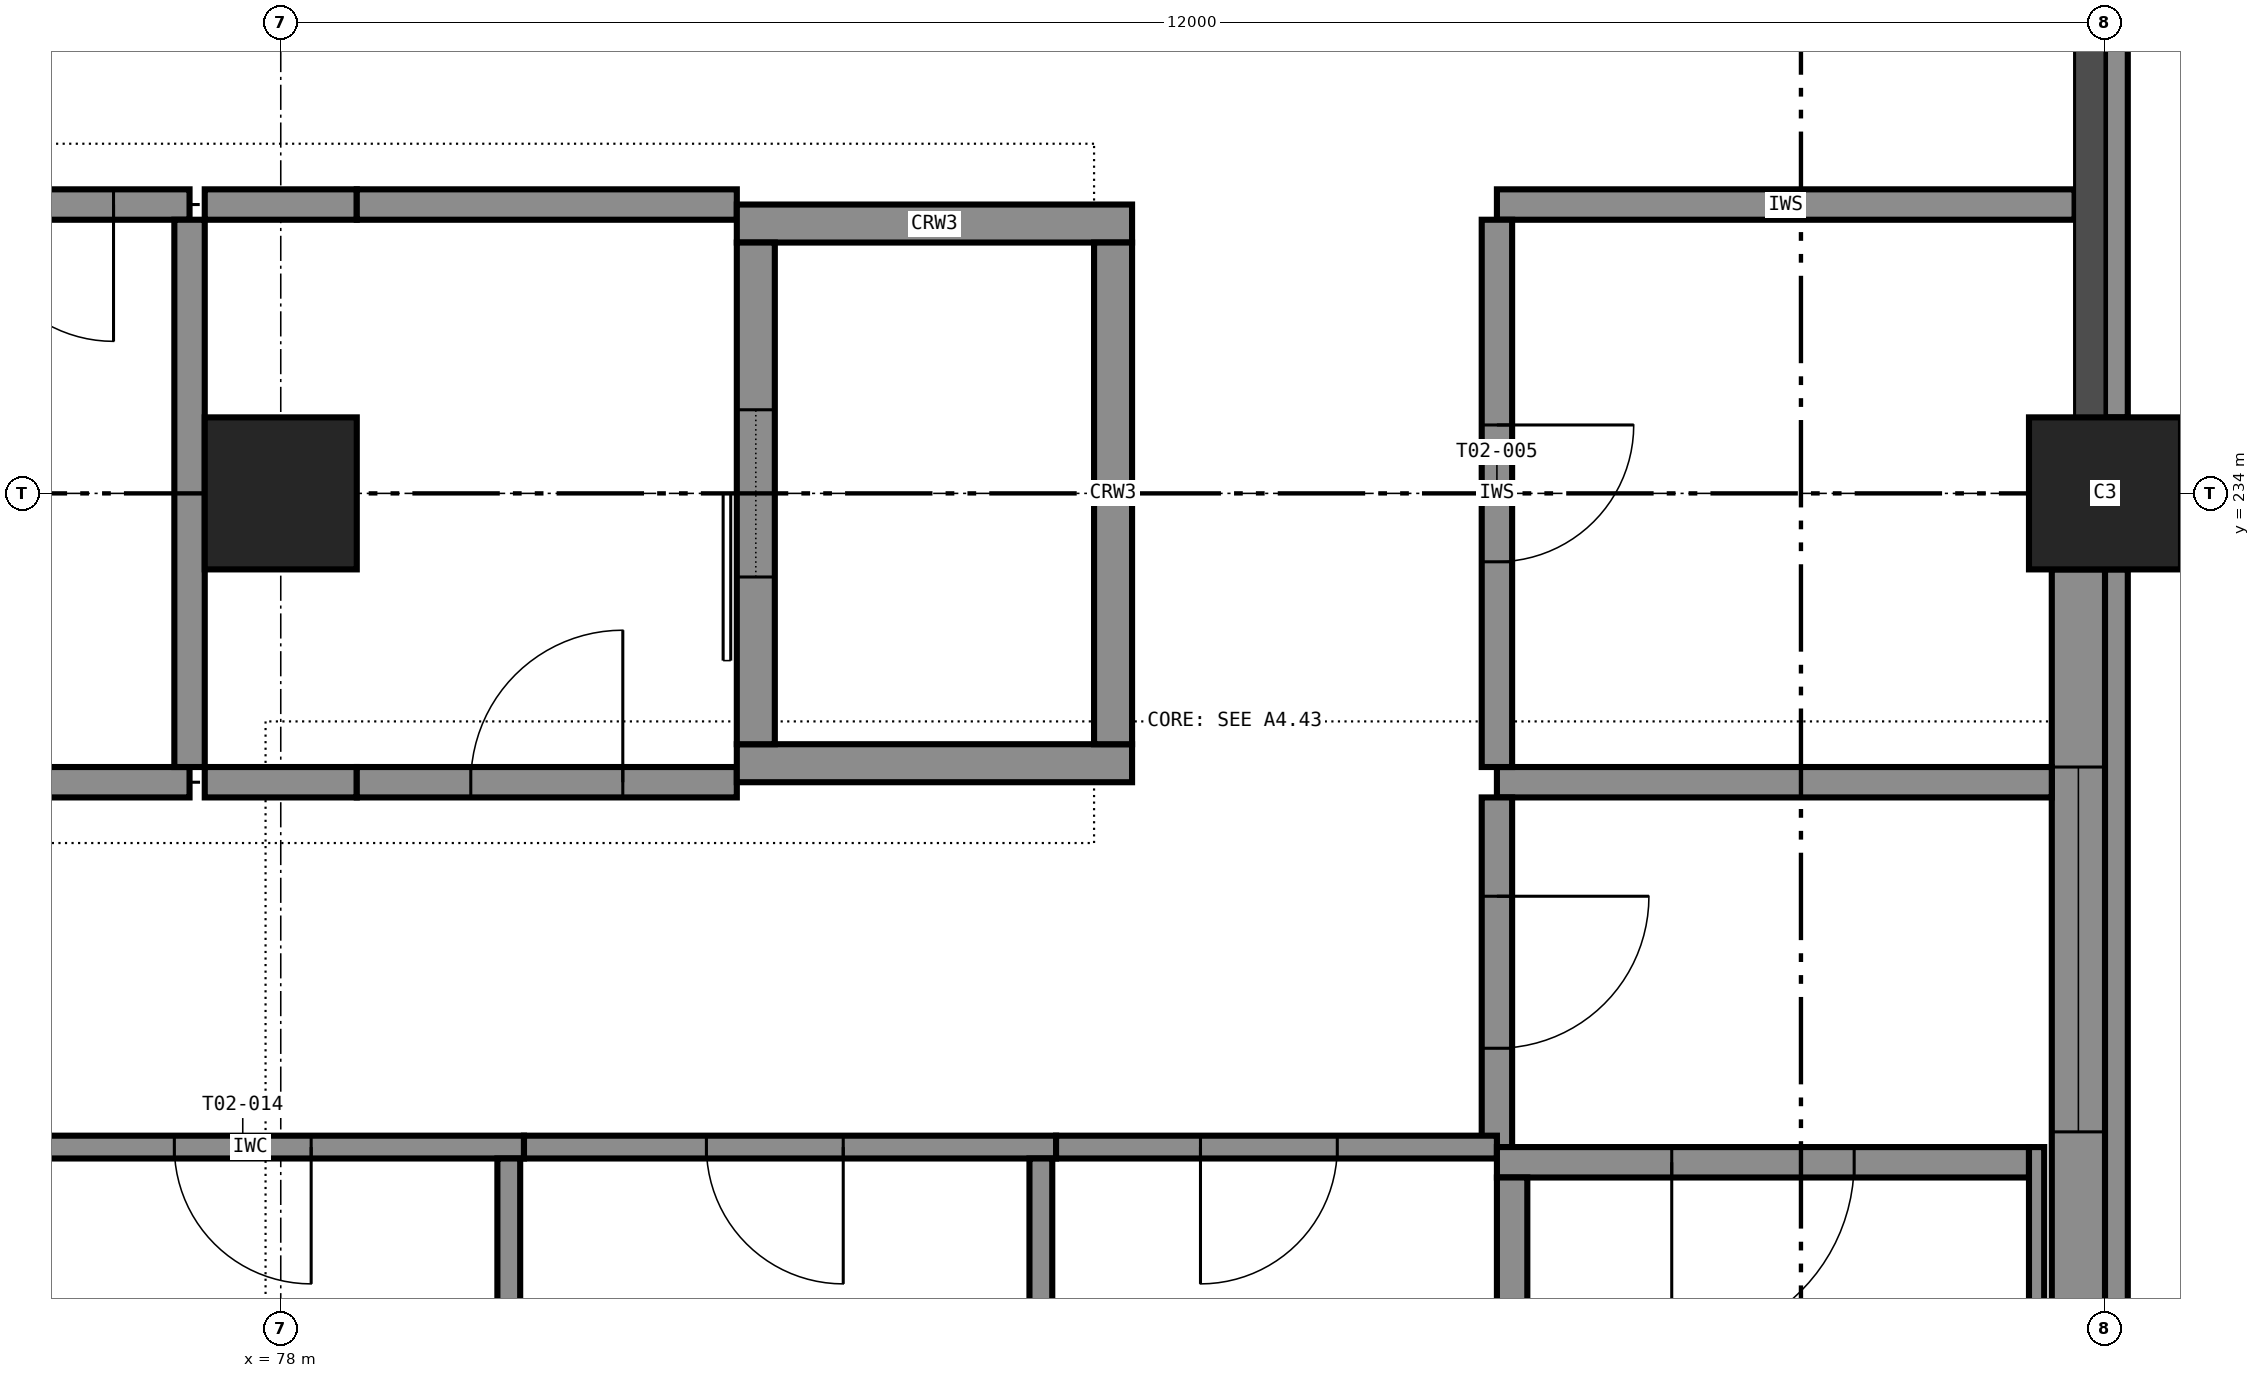
"""IFC4 building model, lengths in metres.
Left out: names, types, materials, properties, quantities, classifications, styles, units other than length and angle.
Written with IfcOpenShell. Run it as: python <this file> out.ifc"""

import sys

from ifc_helpers import new_model, si_unit, direction, frame, frame_2d, origin, origin_2d, place, context, subcontext, project, spatial, rectangle, extrude, element, fill, save


model = new_model("IFC4")
c1 = context("Model", 3, precision=1e-05, world=origin(), true_north=direction((0.0, 1.0)))
c2 = subcontext(c1, "Body", "Model", "MODEL_VIEW")
j1 = project(units=[si_unit("LENGTHUNIT", "METRE"), si_unit("PLANEANGLEUNIT", "RADIAN")], contexts=[c1])
p1 = place(None, origin())
s1 = spatial("IfcSite", under=j1, at=p1, CompositionType="ELEMENT")
p2 = place(p1, origin())
s2 = spatial("IfcBuilding", under=s1, at=p2, CompositionType="ELEMENT")
p3 = place(p2, frame((0.0, 0.0, 12.0)))
s3 = spatial("IfcBuildingStorey", under=s2, at=p3, CompositionType="ELEMENT", Elevation=12.0)
for number, where, z_axis, x_axis in (
    (1, (78.0, 234.0, 0.0), (0.0, 0.0, 1.0), (1.0, 0.0, 0.0)),
    (2, (90.0, 234.0, 0.0), (0.0, 0.0, 1.0), (1.0, 0.0, 0.0)),
):
    element("IfcColumn", number, at=place(p3, frame(where, z_axis=z_axis, x_axis=x_axis)), inside=s3, PredefinedType="COLUMN", context=c2, shape_type="SweptSolid", body=[
        extrude(rectangle(XDim=1.0, YDim=1.0, at=origin_2d()), origin(), (0.0, 0.0, 1.0), 5.0),
    ])
for number, where, z_axis, x_axis in (
    (3, (81.0, 232.225, 0.0), (0.0, 0.0, 1.0), (1.0, 0.0, 0.0)),
    (4, (81.0, 235.775, 0.0), (0.0, 0.0, 1.0), (1.0, 0.0, 0.0)),
):
    element("IfcWall", number, at=place(p3, frame(where, z_axis=z_axis, x_axis=x_axis)), inside=s3, PredefinedType="SHEAR", context=c2, shape_type="SweptSolid", body=[
        extrude(rectangle(XDim=2.6, YDim=0.25, at=frame_2d((1.3, 0.0))), origin(), (0.0, 0.0, 1.0), 5.0),
    ])
p4 = place(p3, frame((81.125, 232.35, 0.0), z_axis=(0.0, 0.0, 1.0), x_axis=(0.0, 1.0, 0.0)))
e5 = element("IfcWall", 5, at=p4, inside=s3, PredefinedType="SHEAR", context=c2, shape_type="SweptSolid", body=[
    extrude(rectangle(XDim=3.3, YDim=0.25, at=frame_2d((1.65, 0.0))), origin(), (0.0, 0.0, 1.0), 5.0),
])
p5 = place(p4, frame((1.1, 0.0, 0.0)))
e6 = element("IfcOpeningElement", 6, at=p5, cuts=e5, PredefinedType="OPENING", context=c2, shape_type="SweptSolid", body=[
    extrude(rectangle(XDim=1.1, YDim=2.1, at=frame_2d((0.55, 1.05))), frame((0.0, 0.135, 0.0), z_axis=(0.0, -1.0, 0.0), x_axis=(1.0, 0.0, 0.0)), (0.0, 0.0, 1.0), 0.27),
])
p6 = place(p3, frame((83.475, 232.35, 0.0), z_axis=(0.0, 0.0, 1.0), x_axis=(0.0, 1.0, 0.0)))
e7 = element("IfcWall", 7, at=p6, inside=s3, PredefinedType="SHEAR", context=c2, shape_type="SweptSolid", body=[
    extrude(rectangle(XDim=3.3, YDim=0.25, at=frame_2d((1.65, 0.0))), origin(), (0.0, 0.0, 1.0), 5.0),
])
p7 = place(p3, frame((89.5, 229.6, 0.0), z_axis=(0.0, 0.0, 1.0), x_axis=(-1.0, 0.0, 0.0)))
e8 = element("IfcWall", 8, at=p7, inside=s3, PredefinedType="SHEAR", context=c2, shape_type="SweptSolid", body=[
    extrude(rectangle(XDim=3.5, YDim=0.2, at=frame_2d((1.75, 0.0))), origin(), (0.0, 0.0, 1.0), 5.0),
])
p8 = place(p7, frame((1.15, 0.0, 0.0)))
e9 = element("IfcOpeningElement", 9, at=p8, cuts=e8, PredefinedType="OPENING", context=c2, shape_type="SweptSolid", body=[
    extrude(rectangle(XDim=1.2, YDim=2.1, at=frame_2d((0.6, 1.05))), frame((0.0, 0.11, 0.0), z_axis=(0.0, -1.0, 0.0), x_axis=(1.0, 0.0, 0.0)), (0.0, 0.0, 1.0), 0.22),
])
p9 = place(p3, frame((86.1, 222.0, 0.0), z_axis=(0.0, 0.0, 1.0), x_axis=(0.0, 1.0, 0.0)))
e10 = element("IfcWall", 10, at=p9, inside=s3, PredefinedType="SHEAR", context=c2, shape_type="SweptSolid", body=[
    extrude(rectangle(XDim=7.5, YDim=0.2, at=frame_2d((3.75, 0.0))), origin(), (0.0, 0.0, 1.0), 5.0),
])
p10 = place(p3, frame((89.55, 229.7, 0.0), z_axis=(0.0, 0.0, 1.0), x_axis=(0.0, -1.0, 0.0)))
e11 = element("IfcWall", 11, at=p10, inside=s3, PredefinedType="SHEAR", context=c2, shape_type="SweptSolid", body=[
    extrude(rectangle(XDim=7.7, YDim=0.1, at=frame_2d((3.85, 0.0))), origin(), (0.0, 0.0, 1.0), 4.75),
])
p11 = place(p3, frame((89.825, 222.0, 0.0), z_axis=(0.0, 0.0, 1.0), x_axis=(0.0, 1.0, 0.0)))
e12 = element("IfcWall", 12, at=p11, inside=s3, PredefinedType="STANDARD", context=c2, shape_type="SweptSolid", body=[
    extrude(rectangle(XDim=11.5, YDim=0.35, at=frame_2d((5.75, 0.0))), origin(), (0.0, 0.0, 1.0), 3.75),
])
p12 = place(p11, frame((1.55, 0.0, 0.6)))
e13 = element("IfcOpeningElement", 13, at=p12, cuts=e12, PredefinedType="OPENING", context=c2, shape_type="SweptSolid", body=[
    extrude(rectangle(XDim=2.4, YDim=2.4, at=frame_2d((1.2, 1.2))), frame((0.0, 0.185, 0.0), z_axis=(0.0, -1.0, 0.0), x_axis=(1.0, 0.0, 0.0)), (0.0, 0.0, 1.0), 0.37),
])
p13 = place(p11, frame((7.8, 0.0, 0.6)))
e14 = element("IfcOpeningElement", 14, at=p13, cuts=e12, PredefinedType="OPENING", context=c2, shape_type="SweptSolid", body=[
    extrude(rectangle(XDim=2.4, YDim=2.4, at=frame_2d((1.2, 1.2))), frame((0.0, 0.185, 0.0), z_axis=(0.0, -1.0, 0.0), x_axis=(1.0, 0.0, 0.0)), (0.0, 0.0, 1.0), 0.37),
])
p14 = place(p3, frame((90.075, 222.0, 4.75), z_axis=(0.0, 0.0, 1.0), x_axis=(0.0, 1.0, 0.0)))
e15 = element("IfcWall", 15, at=p14, inside=s3, PredefinedType="STANDARD", context=c2, shape_type="SweptSolid", body=[
    extrude(rectangle(XDim=11.5, YDim=0.15, at=frame_2d((5.75, 0.0))), origin(), (0.0, 0.0, 1.0), 0.25),
])
p15 = place(p3, frame((90.075, 234.5, 4.75), z_axis=(0.0, 0.0, 1.0), x_axis=(0.0, 1.0, 0.0)))
e16 = element("IfcWall", 16, at=p15, inside=s3, PredefinedType="STANDARD", context=c2, shape_type="SweptSolid", body=[
    extrude(rectangle(XDim=11.0, YDim=0.15, at=frame_2d((5.5, 0.0))), origin(), (0.0, 0.0, 1.0), 0.25),
])
p16 = place(p3, frame((75.5, 232.1, 0.0), z_axis=(0.0, 0.0, 1.0), x_axis=(1.0, 0.0, 0.0)))
e17 = element("IfcWall", 17, at=p16, inside=s3, PredefinedType="PARTITIONING", context=c2, shape_type="SweptSolid", body=[
    extrude(rectangle(XDim=1.9, YDim=0.2, at=frame_2d((0.95, 0.0))), origin(), (0.0, 0.0, 1.0), 4.75),
])
p17 = place(p3, frame((77.5, 232.1, 0.0), z_axis=(0.0, 0.0, 1.0), x_axis=(1.0, 0.0, 0.0)))
e18 = element("IfcWall", 18, at=p17, inside=s3, PredefinedType="PARTITIONING", context=c2, shape_type="SweptSolid", body=[
    extrude(rectangle(XDim=1.0, YDim=0.2, at=frame_2d((0.5, 0.0))), origin(), (0.0, 0.0, 1.0), 4.75),
])
p18 = place(p3, frame((78.5, 232.1, 0.0), z_axis=(0.0, 0.0, 1.0), x_axis=(1.0, 0.0, 0.0)))
e19 = element("IfcWall", 19, at=p18, inside=s3, PredefinedType="PARTITIONING", context=c2, shape_type="SweptSolid", body=[
    extrude(rectangle(XDim=2.5, YDim=0.2, at=frame_2d((1.25, 0.0))), origin(), (0.0, 0.0, 1.0), 4.75),
])
p19 = place(p18, frame((0.75, 0.0, 0.0)))
e20 = element("IfcOpeningElement", 20, at=p19, cuts=e19, PredefinedType="OPENING", context=c2, shape_type="SweptSolid", body=[
    extrude(rectangle(XDim=1.0, YDim=2.1, at=frame_2d((0.5, 1.05))), frame((0.0, 0.11, 0.0), z_axis=(0.0, -1.0, 0.0), x_axis=(1.0, 0.0, 0.0)), (0.0, 0.0, 1.0), 0.22),
])
p20 = place(p3, frame((86.0, 232.1, 0.0), z_axis=(0.0, 0.0, 1.0), x_axis=(1.0, 0.0, 0.0)))
e21 = element("IfcWall", 21, at=p20, inside=s3, PredefinedType="PARTITIONING", context=c2, shape_type="SweptSolid", body=[
    extrude(rectangle(XDim=3.65, YDim=0.2, at=frame_2d((1.825, 0.0))), origin(), (0.0, 0.0, 1.0), 4.75),
])
p21 = place(p3, frame((77.4, 235.9, 0.0), z_axis=(0.0, 0.0, 1.0), x_axis=(-1.0, 0.0, 0.0)))
e22 = element("IfcWall", 22, at=p21, inside=s3, PredefinedType="PARTITIONING", context=c2, shape_type="SweptSolid", body=[
    extrude(rectangle(XDim=1.9, YDim=0.2, at=frame_2d((0.95, 0.0))), origin(), (0.0, 0.0, 1.0), 4.75),
])
p22 = place(p21, frame((0.5, 0.0, 0.0)))
e23 = element("IfcOpeningElement", 23, at=p22, cuts=e22, PredefinedType="OPENING", context=c2, shape_type="SweptSolid", body=[
    extrude(rectangle(XDim=0.9, YDim=2.1, at=frame_2d((0.45, 1.05))), frame((0.0, 0.11, 0.0), z_axis=(0.0, -1.0, 0.0), x_axis=(1.0, 0.0, 0.0)), (0.0, 0.0, 1.0), 0.22),
])
p23 = place(p3, frame((77.5, 235.9, 0.0), z_axis=(0.0, 0.0, 1.0), x_axis=(1.0, 0.0, 0.0)))
e24 = element("IfcWall", 24, at=p23, inside=s3, PredefinedType="PARTITIONING", context=c2, shape_type="SweptSolid", body=[
    extrude(rectangle(XDim=1.0, YDim=0.2, at=frame_2d((0.5, 0.0))), origin(), (0.0, 0.0, 1.0), 4.75),
])
p24 = place(p3, frame((78.5, 235.9, 0.0), z_axis=(0.0, 0.0, 1.0), x_axis=(1.0, 0.0, 0.0)))
e25 = element("IfcWall", 25, at=p24, inside=s3, PredefinedType="PARTITIONING", context=c2, shape_type="SweptSolid", body=[
    extrude(rectangle(XDim=2.5, YDim=0.2, at=frame_2d((1.25, 0.0))), origin(), (0.0, 0.0, 1.0), 4.75),
])
p25 = place(p3, frame((86.0, 235.9, 0.0), z_axis=(0.0, 0.0, 1.0), x_axis=(1.0, 0.0, 0.0)))
e26 = element("IfcWall", 26, at=p25, inside=s3, PredefinedType="PARTITIONING", context=c2, shape_type="SweptSolid", body=[
    extrude(rectangle(XDim=3.8, YDim=0.2, at=frame_2d((1.9, 0.0))), origin(), (0.0, 0.0, 1.0), 4.75),
])
p26 = place(p3, frame((77.4, 232.2, 0.0), z_axis=(0.0, 0.0, 1.0), x_axis=(0.0, 1.0, 0.0)))
e27 = element("IfcWall", 27, at=p26, inside=s3, PredefinedType="PARTITIONING", context=c2, shape_type="SweptSolid", body=[
    extrude(rectangle(XDim=3.6, YDim=0.2, at=frame_2d((1.8, 0.0))), origin(), (0.0, 0.0, 1.0), 4.75),
])
p27 = place(p3, frame((86.0, 235.8, 0.0), z_axis=(0.0, 0.0, 1.0), x_axis=(0.0, -1.0, 0.0)))
e28 = element("IfcWall", 28, at=p27, inside=s3, PredefinedType="PARTITIONING", context=c2, shape_type="SweptSolid", body=[
    extrude(rectangle(XDim=3.6, YDim=0.2, at=frame_2d((1.8, 0.0))), origin(), (0.0, 0.0, 1.0), 4.75),
])
p28 = place(p27, frame((1.35, 0.0, 0.0)))
e29 = element("IfcOpeningElement", 29, at=p28, cuts=e28, PredefinedType="OPENING", context=c2, shape_type="SweptSolid", body=[
    extrude(rectangle(XDim=0.9, YDim=2.1, at=frame_2d((0.45, 1.05))), frame((0.0, 0.11, 0.0), z_axis=(0.0, -1.0, 0.0), x_axis=(1.0, 0.0, 0.0)), (0.0, 0.0, 1.0), 0.22),
])
p29 = place(p3, frame((86.0, 232.0, 0.0), z_axis=(0.0, 0.0, 1.0), x_axis=(0.0, -1.0, 0.0)))
e30 = element("IfcWall", 30, at=p29, inside=s3, PredefinedType="PARTITIONING", context=c2, shape_type="SweptSolid", body=[
    extrude(rectangle(XDim=2.3, YDim=0.2, at=frame_2d((1.15, 0.0))), origin(), (0.0, 0.0, 1.0), 4.75),
])
p30 = place(p29, frame((0.65, 0.0, 0.0)))
e31 = element("IfcOpeningElement", 31, at=p30, cuts=e30, PredefinedType="OPENING", context=c2, shape_type="SweptSolid", body=[
    extrude(rectangle(XDim=1.0, YDim=2.1, at=frame_2d((0.5, 1.05))), frame((0.0, 0.11, 0.0), z_axis=(0.0, -1.0, 0.0), x_axis=(1.0, 0.0, 0.0)), (0.0, 0.0, 1.0), 0.22),
])
p31 = place(p3, frame((79.6, 229.7, 0.0), z_axis=(0.0, 0.0, 1.0), x_axis=(-1.0, 0.0, 0.0)))
e32 = element("IfcWall", 32, at=p31, inside=s3, PredefinedType="PARTITIONING", context=c2, shape_type="SweptSolid", body=[
    extrude(rectangle(XDim=3.6, YDim=0.15, at=frame_2d((1.8, 0.0))), origin(), (0.0, 0.0, 1.0), 4.75),
])
p32 = place(p31, frame((1.4, 0.0, 0.0)))
e33 = element("IfcOpeningElement", 33, at=p32, cuts=e32, PredefinedType="OPENING", context=c2, shape_type="SweptSolid", body=[
    extrude(rectangle(XDim=0.9, YDim=2.1, at=frame_2d((0.45, 1.05))), frame((0.0, 0.085, 0.0), z_axis=(0.0, -1.0, 0.0), x_axis=(1.0, 0.0, 0.0)), (0.0, 0.0, 1.0), 0.17),
])
p33 = place(p3, frame((83.1, 229.7, 0.0), z_axis=(0.0, 0.0, 1.0), x_axis=(-1.0, 0.0, 0.0)))
e34 = element("IfcWall", 34, at=p33, inside=s3, PredefinedType="PARTITIONING", context=c2, shape_type="SweptSolid", body=[
    extrude(rectangle(XDim=3.5, YDim=0.15, at=frame_2d((1.75, 0.0))), origin(), (0.0, 0.0, 1.0), 4.75),
])
p34 = place(p33, frame((1.4, 0.0, 0.0)))
e35 = element("IfcOpeningElement", 35, at=p34, cuts=e34, PredefinedType="OPENING", context=c2, shape_type="SweptSolid", body=[
    extrude(rectangle(XDim=0.9, YDim=2.1, at=frame_2d((0.45, 1.05))), frame((0.0, 0.085, 0.0), z_axis=(0.0, -1.0, 0.0), x_axis=(1.0, 0.0, 0.0)), (0.0, 0.0, 1.0), 0.17),
])
p35 = place(p3, frame((79.5, 222.4, 0.0), z_axis=(0.0, 0.0, 1.0), x_axis=(0.0, 1.0, 0.0)))
e36 = element("IfcWall", 36, at=p35, inside=s3, PredefinedType="PARTITIONING", context=c2, shape_type="SweptSolid", body=[
    extrude(rectangle(XDim=7.225, YDim=0.15, at=frame_2d((3.613, 0.0))), origin(), (0.0, 0.0, 1.0), 4.75),
])
p36 = place(p3, frame((86.0, 229.7, 0.0), z_axis=(0.0, 0.0, 1.0), x_axis=(-1.0, 0.0, 0.0)))
e37 = element("IfcWall", 37, at=p36, inside=s3, PredefinedType="PARTITIONING", context=c2, shape_type="SweptSolid", body=[
    extrude(rectangle(XDim=2.9, YDim=0.15, at=frame_2d((1.45, 0.0))), origin(), (0.0, 0.0, 1.0), 4.75),
])
p37 = place(p36, frame((1.05, 0.0, 0.0)))
e38 = element("IfcOpeningElement", 38, at=p37, cuts=e37, PredefinedType="OPENING", context=c2, shape_type="SweptSolid", body=[
    extrude(rectangle(XDim=0.9, YDim=2.1, at=frame_2d((0.45, 1.05))), frame((0.0, 0.085, 0.0), z_axis=(0.0, -1.0, 0.0), x_axis=(1.0, 0.0, 0.0)), (0.0, 0.0, 1.0), 0.17),
])
p38 = place(p3, frame((83.0, 222.4, 0.0), z_axis=(0.0, 0.0, 1.0), x_axis=(0.0, 1.0, 0.0)))
e39 = element("IfcWall", 39, at=p38, inside=s3, PredefinedType="PARTITIONING", context=c2, shape_type="SweptSolid", body=[
    extrude(rectangle(XDim=7.225, YDim=0.15, at=frame_2d((3.613, 0.0))), origin(), (0.0, 0.0, 1.0), 4.75),
])
p39 = place(p13, origin())
e40 = element("IfcWindow", 40, at=p39, inside=s3, PartitioningType="SINGLE_PANEL", PredefinedType="WINDOW", context=c2, shape_type="SweptSolid", body=[
    extrude(rectangle(XDim=2.4, YDim=2.4, at=frame_2d((1.2, 1.2))), frame((0.0, 0.03, 0.0), z_axis=(0.0, -1.0, 0.0), x_axis=(1.0, 0.0, 0.0)), (0.0, 0.0, 1.0), 0.06),
])
fill(e14, e40)
p40 = place(p22, origin())
e41 = element("IfcDoor", 41, at=p40, inside=s3, OperationType="SINGLE_SWING_LEFT", PredefinedType="DOOR", context=c2, shape_type="SweptSolid", body=[
    extrude(rectangle(XDim=0.9, YDim=2.1, at=frame_2d((0.45, 1.05))), frame((0.0, 0.025, 0.0), z_axis=(0.0, -1.0, 0.0), x_axis=(1.0, 0.0, 0.0)), (0.0, 0.0, 1.0), 0.05),
])
fill(e23, e41)
p41 = place(p19, origin())
e42 = element("IfcDoor", 42, at=p41, inside=s3, OperationType="SINGLE_SWING_RIGHT", PredefinedType="DOOR", context=c2, shape_type="SweptSolid", body=[
    extrude(rectangle(XDim=1.0, YDim=2.1, at=frame_2d((0.5, 1.05))), frame((0.0, 0.025, 0.0), z_axis=(0.0, -1.0, 0.0), x_axis=(1.0, 0.0, 0.0)), (0.0, 0.0, 1.0), 0.05),
])
fill(e20, e42)
p42 = place(p28, origin())
e43 = element("IfcDoor", 43, at=p42, inside=s3, OperationType="SINGLE_SWING_LEFT", PredefinedType="DOOR", context=c2, shape_type="SweptSolid", body=[
    extrude(rectangle(XDim=0.9, YDim=2.1, at=frame_2d((0.45, 1.05))), frame((0.0, 0.025, 0.0), z_axis=(0.0, -1.0, 0.0), x_axis=(1.0, 0.0, 0.0)), (0.0, 0.0, 1.0), 0.05),
])
fill(e29, e43)
p43 = place(p30, origin())
e44 = element("IfcDoor", 44, at=p43, inside=s3, OperationType="SINGLE_SWING_LEFT", PredefinedType="DOOR", context=c2, shape_type="SweptSolid", body=[
    extrude(rectangle(XDim=1.0, YDim=2.1, at=frame_2d((0.5, 1.05))), frame((0.0, 0.025, 0.0), z_axis=(0.0, -1.0, 0.0), x_axis=(1.0, 0.0, 0.0)), (0.0, 0.0, 1.0), 0.05),
])
fill(e31, e44)
p44 = place(p32, origin())
e45 = element("IfcDoor", 45, at=p44, inside=s3, OperationType="SINGLE_SWING_LEFT", PredefinedType="DOOR", context=c2, shape_type="SweptSolid", body=[
    extrude(rectangle(XDim=0.9, YDim=2.1, at=frame_2d((0.45, 1.05))), frame((0.0, 0.025, 0.0), z_axis=(0.0, -1.0, 0.0), x_axis=(1.0, 0.0, 0.0)), (0.0, 0.0, 1.0), 0.05),
])
fill(e33, e45)
p45 = place(p34, origin())
e46 = element("IfcDoor", 46, at=p45, inside=s3, OperationType="SINGLE_SWING_LEFT", PredefinedType="DOOR", context=c2, shape_type="SweptSolid", body=[
    extrude(rectangle(XDim=0.9, YDim=2.1, at=frame_2d((0.45, 1.05))), frame((0.0, 0.025, 0.0), z_axis=(0.0, -1.0, 0.0), x_axis=(1.0, 0.0, 0.0)), (0.0, 0.0, 1.0), 0.05),
])
fill(e35, e46)
p46 = place(p37, origin())
e47 = element("IfcDoor", 47, at=p46, inside=s3, OperationType="SINGLE_SWING_RIGHT", PredefinedType="DOOR", context=c2, shape_type="SweptSolid", body=[
    extrude(rectangle(XDim=0.9, YDim=2.1, at=frame_2d((0.45, 1.05))), frame((0.0, 0.025, 0.0), z_axis=(0.0, -1.0, 0.0), x_axis=(1.0, 0.0, 0.0)), (0.0, 0.0, 1.0), 0.05),
])
fill(e38, e47)
p47 = place(p5, origin())
e48 = element("IfcDoor", 48, at=p47, inside=s3, OperationType="SLIDING_TO_LEFT", PredefinedType="DOOR", context=c2, shape_type="SweptSolid", body=[
    extrude(rectangle(XDim=1.1, YDim=2.1, at=frame_2d((0.55, 1.05))), frame((0.0, 0.025, 0.0), z_axis=(0.0, -1.0, 0.0), x_axis=(1.0, 0.0, 0.0)), (0.0, 0.0, 1.0), 0.05),
])
fill(e6, e48)
p48 = place(p8, origin())
e49 = element("IfcDoor", 49, at=p48, inside=s3, OperationType="SINGLE_SWING_RIGHT", PredefinedType="DOOR", context=c2, shape_type="SweptSolid", body=[
    extrude(rectangle(XDim=1.2, YDim=2.1, at=frame_2d((0.6, 1.05))), frame((0.0, 0.025, 0.0), z_axis=(0.0, -1.0, 0.0), x_axis=(1.0, 0.0, 0.0)), (0.0, 0.0, 1.0), 0.05),
])
fill(e9, e49)
save(model, sys.argv[1])
